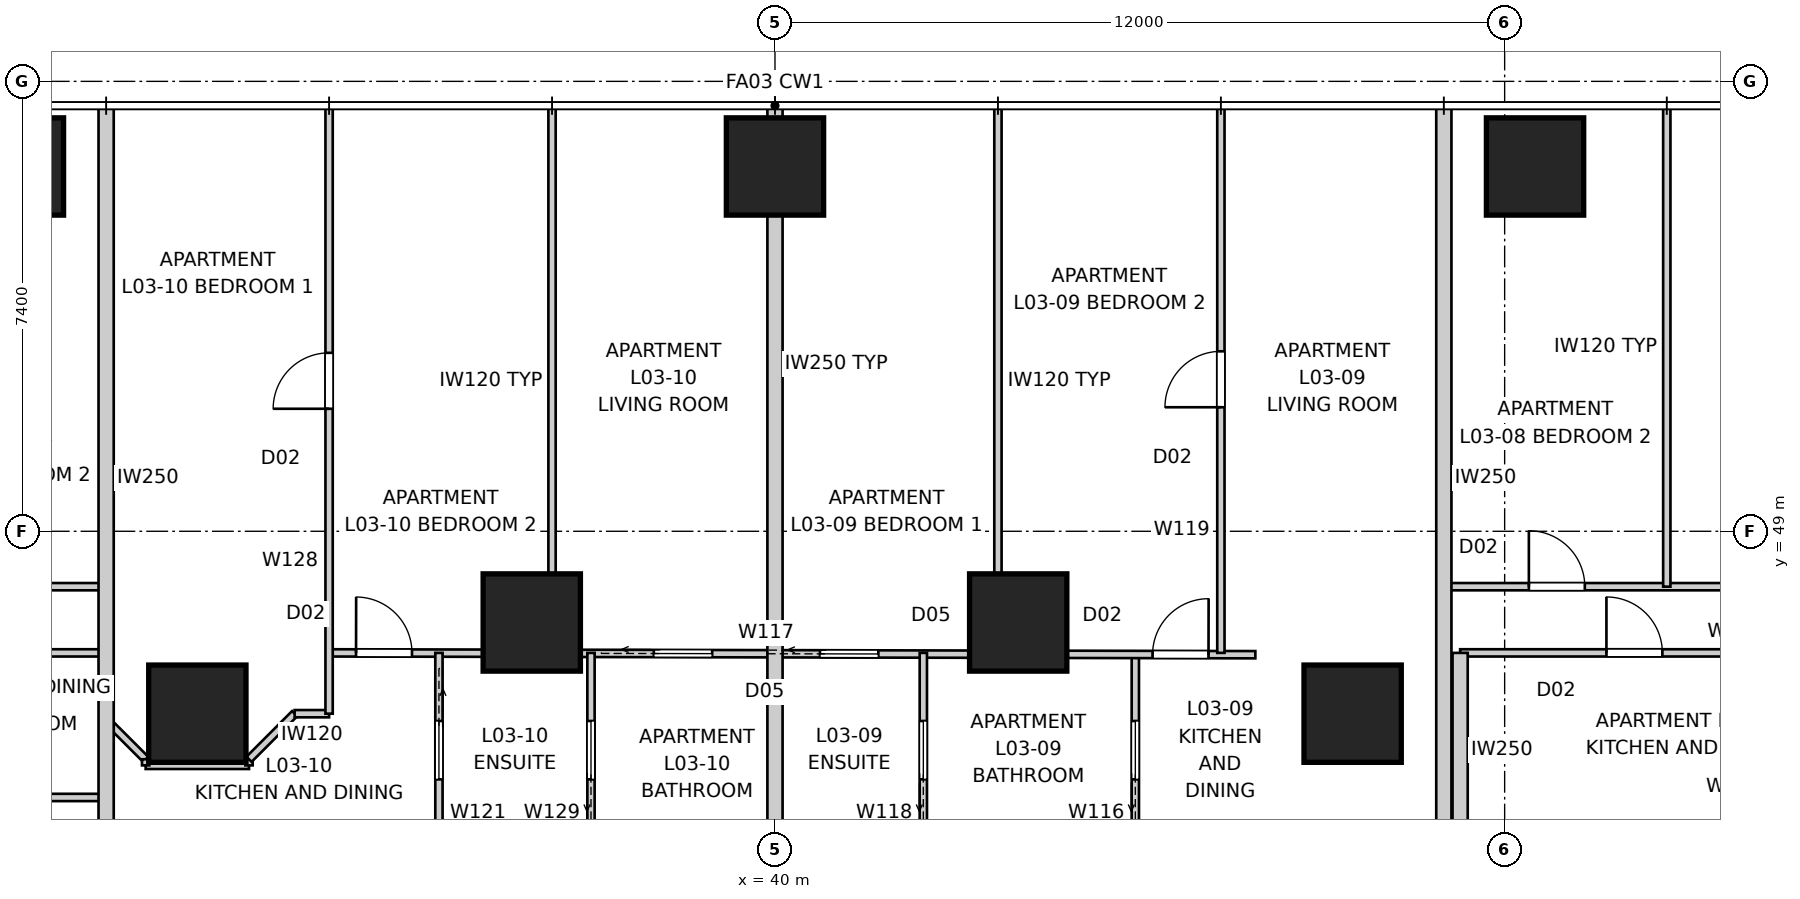
"""IFC4 building model, lengths in metres.
Left out: names, types, materials, properties, quantities, classifications, styles, units other than length and angle.
Written with IfcOpenShell. Run it as: python <this file> out.ifc"""

import sys

from ifc_helpers import new_model, si_unit, direction, frame, frame_2d, origin, origin_2d, place, context, subcontext, project, spatial, rectangle, extrude, element, fill, save


model = new_model("IFC4")
c1 = context("Model", 3, precision=1e-05, world=origin(), true_north=direction((0.0, 1.0)))
c2 = subcontext(c1, "Body", "Model", "MODEL_VIEW")
j1 = project(units=[si_unit("LENGTHUNIT", "METRE"), si_unit("PLANEANGLEUNIT", "RADIAN")], contexts=[c1])
p1 = place(None, origin())
s1 = spatial("IfcSite", under=j1, at=p1, CompositionType="ELEMENT")
p2 = place(p1, origin())
s2 = spatial("IfcBuilding", under=s1, at=p2, CompositionType="ELEMENT")
p3 = place(p2, frame((0.0, 0.0, 15.0)))
s3 = spatial("IfcBuildingStorey", under=s2, at=p3, CompositionType="ELEMENT", Elevation=15.0)
for number, where, z_axis, x_axis in (
    (1, (52.5, 55.0, 0.0), (0.0, 0.0, 1.0), (1.0, 0.0, 0.0)),
    (2, (40.0, 55.0, 0.0), (0.0, 0.0, 1.0), (1.0, 0.0, 0.0)),
    (3, (27.5, 55.0, 0.0), (0.0, 0.0, 1.0), (1.0, 0.0, 0.0)),
    (4, (49.5, 46.0, 0.0), (0.0, 0.0, 1.0), (1.0, 0.0, 0.0)),
    (5, (44.0, 47.5, 0.0), (0.0, 0.0, 1.0), (1.0, 0.0, 0.0)),
    (6, (36.0, 47.5, 0.0), (0.0, 0.0, 1.0), (1.0, 0.0, 0.0)),
    (7, (30.5, 46.0, 0.0), (0.0, 0.0, 1.0), (1.0, 0.0, 0.0)),
):
    element("IfcColumn", number, at=place(p3, frame(where, z_axis=z_axis, x_axis=x_axis)), inside=s3, PredefinedType="COLUMN", context=c2, shape_type="SweptSolid", body=[
        extrude(rectangle(XDim=1.6, YDim=1.6, at=origin_2d()), origin(), (0.0, 0.0, 1.0), 3.4),
    ])
for number, where, z_axis, x_axis in (
    (8, (51.0, 56.0, 0.0), (0.0, 0.0, 1.0), (0.0, -1.0, 0.0)),
    (9, (29.0, 56.0, 0.0), (0.0, 0.0, 1.0), (0.0, -1.0, 0.0)),
):
    element("IfcWall", number, at=place(p3, frame(where, z_axis=z_axis, x_axis=x_axis)), inside=s3, PredefinedType="PARTITIONING", context=c2, shape_type="SweptSolid", body=[
        extrude(rectangle(XDim=12.24, YDim=0.25, at=frame_2d((6.12, 0.0))), origin(), (0.0, 0.0, 1.0), 3.25),
    ])
p4 = place(p3, frame((40.0, 56.0, 0.0), z_axis=(0.0, 0.0, 1.0), x_axis=(0.0, -1.0, 0.0)))
e10 = element("IfcWall", 10, at=p4, inside=s3, PredefinedType="PARTITIONING", context=c2, shape_type="SweptSolid", body=[
    extrude(rectangle(XDim=8.5, YDim=0.25, at=frame_2d((4.25, 0.0))), origin(), (0.0, 0.0, 1.0), 3.25),
])
p5 = place(p3, frame((40.0, 47.5, 0.0), z_axis=(0.0, 0.0, 1.0), x_axis=(0.0, -1.0, 0.0)))
e11 = element("IfcWall", 11, at=p5, inside=s3, PredefinedType="PARTITIONING", context=c2, shape_type="SweptSolid", body=[
    extrude(rectangle(XDim=3.74, YDim=0.25, at=frame_2d((1.87, 0.0))), origin(), (0.0, 0.0, 1.0), 2.796),
])
p6 = place(p3, frame((51.268, 47.0, 0.0), z_axis=(0.0, 0.0, 1.0), x_axis=(1.0, 0.0, 0.0)))
e12 = element("IfcWall", 12, at=p6, inside=s3, PredefinedType="PARTITIONING", context=c2, shape_type="SweptSolid", body=[
    extrude(rectangle(XDim=5.732, YDim=0.12, at=frame_2d((2.866, 0.0))), origin(), (0.0, 0.0, 1.0), 3.25),
])
p7 = place(p6, frame((2.406, 0.0, 0.0)))
e13 = element("IfcOpeningElement", 13, at=p7, cuts=e12, PredefinedType="OPENING", context=c2, shape_type="SweptSolid", body=[
    extrude(rectangle(XDim=0.92, YDim=2.34, at=frame_2d((0.46, 1.17))), frame((0.0, 0.07, 0.0), z_axis=(0.0, -1.0, 0.0), x_axis=(1.0, 0.0, 0.0)), (0.0, 0.0, 1.0), 0.14),
])
p8 = place(p3, frame((51.268, 43.8, 0.0), z_axis=(0.0, 0.0, 1.0), x_axis=(0.0, 1.0, 0.0)))
e14 = element("IfcWall", 14, at=p8, inside=s3, PredefinedType="PARTITIONING", context=c2, shape_type="SweptSolid", body=[
    extrude(rectangle(XDim=3.2, YDim=0.25, at=frame_2d((1.6, 0.0))), origin(), (0.0, 0.0, 1.0), 3.25),
])
p9 = place(p3, frame((51.0, 48.089, 0.0), z_axis=(0.0, 0.0, 1.0), x_axis=(1.0, 0.0, 0.0)))
e15 = element("IfcWall", 15, at=p9, inside=s3, PredefinedType="PARTITIONING", context=c2, shape_type="SweptSolid", body=[
    extrude(rectangle(XDim=14.96, YDim=0.12, at=frame_2d((7.48, 0.0))), origin(), (0.0, 0.0, 1.0), 3.25),
])
p10 = place(p9, frame((6.298, 0.0, 0.0)))
e16 = element("IfcOpeningElement", 16, at=p10, cuts=e15, PredefinedType="OPENING", context=c2, shape_type="SweptSolid", body=[
    extrude(rectangle(XDim=0.92, YDim=2.34, at=frame_2d((0.46, 1.17))), frame((0.0, 0.07, 0.0), z_axis=(0.0, -1.0, 0.0), x_axis=(1.0, 0.0, 0.0)), (0.0, 0.0, 1.0), 0.14),
])
p11 = place(p9, frame((1.398, 0.0, 0.0)))
e17 = element("IfcOpeningElement", 17, at=p11, cuts=e15, PredefinedType="OPENING", context=c2, shape_type="SweptSolid", body=[
    extrude(rectangle(XDim=0.92, YDim=2.34, at=frame_2d((0.46, 1.17))), frame((0.0, 0.07, 0.0), z_axis=(0.0, -1.0, 0.0), x_axis=(1.0, 0.0, 0.0)), (0.0, 0.0, 1.0), 0.14),
])
p12 = place(p3, frame((54.667, 48.089, 0.0), z_axis=(0.0, 0.0, 1.0), x_axis=(0.0, 1.0, 0.0)))
e18 = element("IfcWall", 18, at=p12, inside=s3, PredefinedType="PARTITIONING", context=c2, shape_type="SweptSolid", body=[
    extrude(rectangle(XDim=7.871, YDim=0.12, at=frame_2d((3.936, 0.0))), origin(), (0.0, 0.0, 1.0), 2.637),
])
p13 = place(p3, frame((45.926, 43.83, 0.0), z_axis=(0.0, 0.0, 1.0), x_axis=(0.0, 1.0, 0.0)))
e19 = element("IfcWall", 19, at=p13, inside=s3, PredefinedType="PARTITIONING", context=c2, shape_type="SweptSolid", body=[
    extrude(rectangle(XDim=3.14, YDim=0.12, at=frame_2d((1.57, 0.0))), origin(), (0.0, 0.0, 1.0), 3.25),
])
p14 = place(p13, frame((1.09, 0.0, 0.0)))
e20 = element("IfcOpeningElement", 20, at=p14, cuts=e19, PredefinedType="OPENING", context=c2, shape_type="SweptSolid", body=[
    extrude(rectangle(XDim=0.96, YDim=2.1, at=frame_2d((0.48, 1.05))), frame((0.0, 0.07, 0.0), z_axis=(0.0, -1.0, 0.0), x_axis=(1.0, 0.0, 0.0)), (0.0, 0.0, 1.0), 0.14),
])
p15 = place(p3, frame((32.667, 47.0, 0.0), z_axis=(0.0, 0.0, 1.0), x_axis=(0.999998056971, -0.001971307974, 0.0)))
e21 = element("IfcWall", 21, at=p15, inside=s3, PredefinedType="PARTITIONING", context=c2, shape_type="SweptSolid", body=[
    extrude(rectangle(XDim=15.233, YDim=0.12, at=frame_2d((7.617, 0.0))), origin(), (0.0, 0.0, 1.0), 2.549),
])
p16 = place(p15, frame((0.443, 0.0, 0.0)))
e22 = element("IfcOpeningElement", 22, at=p16, cuts=e21, PredefinedType="OPENING", context=c2, shape_type="SweptSolid", body=[
    extrude(rectangle(XDim=0.92, YDim=2.34, at=frame_2d((0.46, 1.17))), frame((0.0, 0.07, 0.0), z_axis=(0.0, -1.0, 0.0), x_axis=(1.0, 0.0, 0.0)), (0.0, 0.0, 1.0), 0.14),
])
p17 = place(p15, frame((13.543, 0.0, 0.0)))
e23 = element("IfcOpeningElement", 23, at=p17, cuts=e21, PredefinedType="OPENING", context=c2, shape_type="SweptSolid", body=[
    extrude(rectangle(XDim=0.92, YDim=2.34, at=frame_2d((0.46, 1.17))), frame((0.0, 0.07, 0.0), z_axis=(0.0, -1.0, 0.0), x_axis=(1.0, 0.0, 0.0)), (0.0, 0.0, 1.0), 0.14),
])
p18 = place(p15, frame((5.34, 0.0, 0.0)))
e24 = element("IfcOpeningElement", 24, at=p18, cuts=e21, PredefinedType="OPENING", context=c2, shape_type="SweptSolid", body=[
    extrude(rectangle(XDim=0.96, YDim=2.1, at=frame_2d((0.48, 1.05))), frame((0.0, 0.07, 0.0), z_axis=(0.0, -1.0, 0.0), x_axis=(1.0, 0.0, 0.0)), (0.0, 0.0, 1.0), 0.14),
])
p19 = place(p15, frame((8.073, 0.0, 0.0)))
e25 = element("IfcOpeningElement", 25, at=p19, cuts=e21, PredefinedType="OPENING", context=c2, shape_type="SweptSolid", body=[
    extrude(rectangle(XDim=0.96, YDim=2.1, at=frame_2d((0.48, 1.05))), frame((0.0, 0.07, 0.0), z_axis=(0.0, -1.0, 0.0), x_axis=(1.0, 0.0, 0.0)), (0.0, 0.0, 1.0), 0.14),
])
p20 = place(p3, frame((42.44, 43.8, 0.0), z_axis=(0.0, 0.0, 1.0), x_axis=(0.0, 1.0, 0.0)))
e26 = element("IfcWall", 26, at=p20, inside=s3, PredefinedType="PARTITIONING", context=c2, shape_type="SweptSolid", body=[
    extrude(rectangle(XDim=3.2, YDim=0.12, at=frame_2d((1.6, 0.0))), origin(), (0.0, 0.0, 1.0), 3.25),
])
p21 = place(p20, frame((1.12, 0.0, 0.0)))
e27 = element("IfcOpeningElement", 27, at=p21, cuts=e26, PredefinedType="OPENING", context=c2, shape_type="SweptSolid", body=[
    extrude(rectangle(XDim=0.96, YDim=2.1, at=frame_2d((0.48, 1.05))), frame((0.0, 0.07, 0.0), z_axis=(0.0, -1.0, 0.0), x_axis=(1.0, 0.0, 0.0)), (0.0, 0.0, 1.0), 0.14),
])
p22 = place(p3, frame((47.333, 47.0, 0.0), z_axis=(0.0, 0.0, 1.0), x_axis=(0.0, 1.0, 0.0)))
e28 = element("IfcWall", 28, at=p22, inside=s3, PredefinedType="PARTITIONING", context=c2, shape_type="SweptSolid", body=[
    extrude(rectangle(XDim=8.96, YDim=0.12, at=frame_2d((4.48, 0.0))), origin(), (0.0, 0.0, 1.0), 3.25),
])
p23 = place(p22, frame((4.04, 0.0, 0.0)))
e29 = element("IfcOpeningElement", 29, at=p23, cuts=e28, PredefinedType="OPENING", context=c2, shape_type="SweptSolid", body=[
    extrude(rectangle(XDim=0.92, YDim=2.34, at=frame_2d((0.46, 1.17))), frame((0.0, 0.07, 0.0), z_axis=(0.0, -1.0, 0.0), x_axis=(1.0, 0.0, 0.0)), (0.0, 0.0, 1.0), 0.14),
])
p24 = place(p3, frame((43.667, 55.96, 0.0), z_axis=(0.0, 0.0, 1.0), x_axis=(0.0, -1.0, 0.0)))
e30 = element("IfcWall", 30, at=p24, inside=s3, PredefinedType="PARTITIONING", context=c2, shape_type="SweptSolid", body=[
    extrude(rectangle(XDim=8.96, YDim=0.12, at=frame_2d((4.48, 0.0))), origin(), (0.0, 0.0, 1.0), 3.25),
])
p25 = place(p3, frame((34.473, 47.0, 0.0), z_axis=(0.0, 0.0, 1.0), x_axis=(0.0, -1.0, 0.0)))
e31 = element("IfcWall", 31, at=p25, inside=s3, PredefinedType="PARTITIONING", context=c2, shape_type="SweptSolid", body=[
    extrude(rectangle(XDim=3.2, YDim=0.12, at=frame_2d((1.6, 0.0))), origin(), (0.0, 0.0, 1.0), 3.25),
])
p26 = place(p25, frame((1.12, 0.0, 0.0)))
e32 = element("IfcOpeningElement", 32, at=p26, cuts=e31, PredefinedType="OPENING", context=c2, shape_type="SweptSolid", body=[
    extrude(rectangle(XDim=0.96, YDim=2.1, at=frame_2d((0.48, 1.05))), frame((0.0, 0.07, 0.0), z_axis=(0.0, -1.0, 0.0), x_axis=(1.0, 0.0, 0.0)), (0.0, 0.0, 1.0), 0.14),
])
p27 = place(p3, frame((29.0, 45.9, 0.0), z_axis=(0.0, 0.0, 1.0), x_axis=(0.707106781187, -0.707106781187, 0.0)))
e33 = element("IfcWall", 33, at=p27, inside=s3, PredefinedType="PARTITIONING", context=c2, shape_type="SweptSolid", body=[
    extrude(rectangle(XDim=0.919, YDim=0.12, at=frame_2d((0.459, 0.0))), origin(), (0.0, 0.0, 1.0), 3.25),
])
p28 = place(p3, frame((29.65, 45.15, 0.0), z_axis=(0.0, 0.0, 1.0), x_axis=(1.0, 0.0, 0.0)))
e34 = element("IfcWall", 34, at=p28, inside=s3, PredefinedType="PARTITIONING", context=c2, shape_type="SweptSolid", body=[
    extrude(rectangle(XDim=1.7, YDim=0.12, at=frame_2d((0.85, 0.0))), origin(), (0.0, 0.0, 1.0), 3.25),
])
p29 = place(p3, frame((31.35, 45.25, 0.0), z_axis=(0.0, 0.0, 1.0), x_axis=(0.707106781187, 0.707106781187, 0.0)))
e35 = element("IfcWall", 35, at=p29, inside=s3, PredefinedType="PARTITIONING", context=c2, shape_type="SweptSolid", body=[
    extrude(rectangle(XDim=1.061, YDim=0.12, at=frame_2d((0.53, 0.0))), origin(), (0.0, 0.0, 1.0), 3.25),
])
p30 = place(p3, frame((32.1, 46.0, 0.0), z_axis=(0.0, 0.0, 1.0), x_axis=(1.0, 0.0, 0.0)))
e36 = element("IfcWall", 36, at=p30, inside=s3, PredefinedType="PARTITIONING", context=c2, shape_type="SweptSolid", body=[
    extrude(rectangle(XDim=0.567, YDim=0.12, at=frame_2d((0.283, 0.0))), origin(), (0.0, 0.0, 1.0), 3.25),
])
p31 = place(p3, frame((32.667, 46.0, 0.0), z_axis=(0.0, 0.0, 1.0), x_axis=(0.0, 1.0, 0.0)))
e37 = element("IfcWall", 37, at=p31, inside=s3, PredefinedType="PARTITIONING", context=c2, shape_type="SweptSolid", body=[
    extrude(rectangle(XDim=9.96, YDim=0.12, at=frame_2d((4.98, 0.0))), origin(), (0.0, 0.0, 1.0), 3.25),
])
p32 = place(p31, frame((5.015, 0.0, 0.0)))
e38 = element("IfcOpeningElement", 38, at=p32, cuts=e37, PredefinedType="OPENING", context=c2, shape_type="SweptSolid", body=[
    extrude(rectangle(XDim=0.92, YDim=2.34, at=frame_2d((0.46, 1.17))), frame((0.0, 0.07, 0.0), z_axis=(0.0, -1.0, 0.0), x_axis=(1.0, 0.0, 0.0)), (0.0, 0.0, 1.0), 0.14),
])
p33 = place(p3, frame((36.974, 43.8, 0.0), z_axis=(0.0, 0.0, 1.0), x_axis=(0.0, 1.0, 0.0)))
e39 = element("IfcWall", 39, at=p33, inside=s3, PredefinedType="PARTITIONING", context=c2, shape_type="SweptSolid", body=[
    extrude(rectangle(XDim=3.2, YDim=0.12, at=frame_2d((1.6, 0.0))), origin(), (0.0, 0.0, 1.0), 3.25),
])
p34 = place(p33, frame((1.12, 0.0, 0.0)))
e40 = element("IfcOpeningElement", 40, at=p34, cuts=e39, PredefinedType="OPENING", context=c2, shape_type="SweptSolid", body=[
    extrude(rectangle(XDim=0.96, YDim=2.1, at=frame_2d((0.48, 1.05))), frame((0.0, 0.07, 0.0), z_axis=(0.0, -1.0, 0.0), x_axis=(1.0, 0.0, 0.0)), (0.0, 0.0, 1.0), 0.14),
])
p35 = place(p3, frame((36.333, 47.0, 0.0), z_axis=(0.0, 0.0, 1.0), x_axis=(0.0, 1.0, 0.0)))
e41 = element("IfcWall", 41, at=p35, inside=s3, PredefinedType="PARTITIONING", context=c2, shape_type="SweptSolid", body=[
    extrude(rectangle(XDim=8.96, YDim=0.12, at=frame_2d((4.48, 0.0))), origin(), (0.0, 0.0, 1.0), 3.25),
])
p36 = place(p3, frame((23.0, 44.622, 0.0), z_axis=(0.0, 0.0, 1.0), x_axis=(1.0, 0.0, 0.0)))
e42 = element("IfcWall", 42, at=p36, inside=s3, PredefinedType="PARTITIONING", context=c2, shape_type="SweptSolid", body=[
    extrude(rectangle(XDim=6.0, YDim=0.12, at=frame_2d((3.0, 0.0))), origin(), (0.0, 0.0, 1.0), 2.637),
])
p37 = place(p36, frame((1.47, 0.0, 0.0)))
e43 = element("IfcOpeningElement", 43, at=p37, cuts=e42, PredefinedType="OPENING", context=c2, shape_type="SweptSolid", body=[
    extrude(rectangle(XDim=0.96, YDim=2.1, at=frame_2d((0.48, 1.05))), frame((0.0, 0.07, 0.0), z_axis=(0.0, -1.0, 0.0), x_axis=(1.0, 0.0, 0.0)), (0.0, 0.0, 1.0), 0.14),
])
p38 = place(p3, frame((23.0, 47.0, 0.0), z_axis=(0.0, 0.0, 1.0), x_axis=(1.0, 0.0, 0.0)))
e44 = element("IfcWall", 44, at=p38, inside=s3, PredefinedType="PARTITIONING", context=c2, shape_type="SweptSolid", body=[
    extrude(rectangle(XDim=6.0, YDim=0.12, at=frame_2d((3.0, 0.0))), origin(), (0.0, 0.0, 1.0), 3.25),
])
p39 = place(p3, frame((14.04, 48.089, 0.0), z_axis=(0.0, 0.0, 1.0), x_axis=(1.0, 0.0, 0.0)))
e45 = element("IfcWall", 45, at=p39, inside=s3, PredefinedType="PARTITIONING", context=c2, shape_type="SweptSolid", body=[
    extrude(rectangle(XDim=14.96, YDim=0.12, at=frame_2d((7.48, 0.0))), origin(), (0.0, 0.0, 1.0), 3.25),
])
p40 = place(p39, frame((7.742, 0.0, 0.0)))
e46 = element("IfcOpeningElement", 46, at=p40, cuts=e45, PredefinedType="OPENING", context=c2, shape_type="SweptSolid", body=[
    extrude(rectangle(XDim=0.92, YDim=2.34, at=frame_2d((0.46, 1.17))), frame((0.0, 0.07, 0.0), z_axis=(0.0, -1.0, 0.0), x_axis=(1.0, 0.0, 0.0)), (0.0, 0.0, 1.0), 0.14),
])
p41 = place(p39, frame((12.642, 0.0, 0.0)))
e47 = element("IfcOpeningElement", 47, at=p41, cuts=e45, PredefinedType="OPENING", context=c2, shape_type="SweptSolid", body=[
    extrude(rectangle(XDim=0.92, YDim=2.34, at=frame_2d((0.46, 1.17))), frame((0.0, 0.07, 0.0), z_axis=(0.0, -1.0, 0.0), x_axis=(1.0, 0.0, 0.0)), (0.0, 0.0, 1.0), 0.14),
])
for number, where, z_axis, x_axis in (
    (48, (29.65, 45.15, 0.0), (0.0, 0.0, 1.0), (0.0, 1.0, 0.0)),
    (49, (31.35, 45.15, 0.0), (0.0, 0.0, 1.0), (0.0, 1.0, 0.0)),
):
    element("IfcWall", number, at=place(p3, frame(where, z_axis=z_axis, x_axis=x_axis)), inside=s3, PredefinedType="PARTITIONING", context=c2, shape_type="SweptSolid", body=[
        extrude(rectangle(XDim=0.1, YDim=0.12, at=frame_2d((0.05, 0.0))), origin(), (0.0, 0.0, 1.0), 3.25),
    ])
p42 = place(p26, origin())
e50 = element("IfcDoor", 50, at=p42, inside=s3, OperationType="SLIDING_TO_LEFT", PredefinedType="DOOR", context=c2, shape_type="SweptSolid", body=[
    extrude(rectangle(XDim=0.96, YDim=2.1, at=frame_2d((0.48, 1.05))), frame((0.0, 0.025, 0.0), z_axis=(0.0, -1.0, 0.0), x_axis=(1.0, 0.0, 0.0)), (0.0, 0.0, 1.0), 0.05),
])
fill(e32, e50)
p43 = place(p16, origin())
e51 = element("IfcDoor", 51, at=p43, inside=s3, OperationType="SINGLE_SWING_LEFT", PredefinedType="DOOR", context=c2, shape_type="SweptSolid", body=[
    extrude(rectangle(XDim=0.92, YDim=2.34, at=frame_2d((0.46, 1.17))), frame((0.0, 0.025, 0.0), z_axis=(0.0, -1.0, 0.0), x_axis=(1.0, 0.0, 0.0)), (0.0, 0.0, 1.0), 0.05),
])
fill(e22, e51)
p44 = place(p14, origin())
e52 = element("IfcDoor", 52, at=p44, inside=s3, OperationType="SLIDING_TO_LEFT", PredefinedType="DOOR", context=c2, shape_type="SweptSolid", body=[
    extrude(rectangle(XDim=0.96, YDim=2.1, at=frame_2d((0.48, 1.05))), frame((0.0, 0.025, 0.0), z_axis=(0.0, -1.0, 0.0), x_axis=(1.0, 0.0, 0.0)), (0.0, 0.0, 1.0), 0.05),
])
fill(e20, e52)
p45 = place(p17, origin())
e53 = element("IfcDoor", 53, at=p45, inside=s3, OperationType="SINGLE_SWING_RIGHT", PredefinedType="DOOR", context=c2, shape_type="SweptSolid", body=[
    extrude(rectangle(XDim=0.92, YDim=2.34, at=frame_2d((0.46, 1.17))), frame((0.0, 0.025, 0.0), z_axis=(0.0, -1.0, 0.0), x_axis=(1.0, 0.0, 0.0)), (0.0, 0.0, 1.0), 0.05),
])
fill(e23, e53)
p46 = place(p7, origin())
e54 = element("IfcDoor", 54, at=p46, inside=s3, OperationType="SINGLE_SWING_LEFT", PredefinedType="DOOR", context=c2, shape_type="SweptSolid", body=[
    extrude(rectangle(XDim=0.92, YDim=2.34, at=frame_2d((0.46, 1.17))), frame((0.0, 0.025, 0.0), z_axis=(0.0, -1.0, 0.0), x_axis=(1.0, 0.0, 0.0)), (0.0, 0.0, 1.0), 0.05),
])
fill(e13, e54)
p47 = place(p34, origin())
e55 = element("IfcDoor", 55, at=p47, inside=s3, OperationType="SLIDING_TO_LEFT", PredefinedType="DOOR", context=c2, shape_type="SweptSolid", body=[
    extrude(rectangle(XDim=0.96, YDim=2.1, at=frame_2d((0.48, 1.05))), frame((0.0, 0.025, 0.0), z_axis=(0.0, -1.0, 0.0), x_axis=(1.0, 0.0, 0.0)), (0.0, 0.0, 1.0), 0.05),
])
fill(e40, e55)
p48 = place(p21, origin())
e56 = element("IfcDoor", 56, at=p48, inside=s3, OperationType="SLIDING_TO_LEFT", PredefinedType="DOOR", context=c2, shape_type="SweptSolid", body=[
    extrude(rectangle(XDim=0.96, YDim=2.1, at=frame_2d((0.48, 1.05))), frame((0.0, 0.025, 0.0), z_axis=(0.0, -1.0, 0.0), x_axis=(1.0, 0.0, 0.0)), (0.0, 0.0, 1.0), 0.05),
])
fill(e27, e56)
p49 = place(p11, origin())
e57 = element("IfcDoor", 57, at=p49, inside=s3, OperationType="SINGLE_SWING_LEFT", PredefinedType="DOOR", context=c2, shape_type="SweptSolid", body=[
    extrude(rectangle(XDim=0.92, YDim=2.34, at=frame_2d((0.46, 1.17))), frame((0.0, 0.025, 0.0), z_axis=(0.0, -1.0, 0.0), x_axis=(1.0, 0.0, 0.0)), (0.0, 0.0, 1.0), 0.05),
])
fill(e17, e57)
p50 = place(p18, origin())
e58 = element("IfcDoor", 58, at=p50, inside=s3, OperationType="SLIDING_TO_LEFT", PredefinedType="DOOR", context=c2, shape_type="SweptSolid", body=[
    extrude(rectangle(XDim=0.96, YDim=2.1, at=frame_2d((0.48, 1.05))), frame((0.0, 0.025, 0.0), z_axis=(0.0, -1.0, 0.0), x_axis=(1.0, 0.0, 0.0)), (0.0, 0.0, 1.0), 0.05),
])
fill(e24, e58)
p51 = place(p19, origin())
e59 = element("IfcDoor", 59, at=p51, inside=s3, OperationType="SLIDING_TO_LEFT", PredefinedType="DOOR", context=c2, shape_type="SweptSolid", body=[
    extrude(rectangle(XDim=0.96, YDim=2.1, at=frame_2d((0.48, 1.05))), frame((0.0, 0.025, 0.0), z_axis=(0.0, -1.0, 0.0), x_axis=(1.0, 0.0, 0.0)), (0.0, 0.0, 1.0), 0.05),
])
fill(e25, e59)
p52 = place(p32, origin())
e60 = element("IfcDoor", 60, at=p52, inside=s3, OperationType="SINGLE_SWING_LEFT", PredefinedType="DOOR", context=c2, shape_type="SweptSolid", body=[
    extrude(rectangle(XDim=0.92, YDim=2.34, at=frame_2d((0.46, 1.17))), frame((0.0, 0.025, 0.0), z_axis=(0.0, -1.0, 0.0), x_axis=(1.0, 0.0, 0.0)), (0.0, 0.0, 1.0), 0.05),
])
fill(e38, e60)
p53 = place(p23, origin())
e61 = element("IfcDoor", 61, at=p53, inside=s3, OperationType="SINGLE_SWING_LEFT", PredefinedType="DOOR", context=c2, shape_type="SweptSolid", body=[
    extrude(rectangle(XDim=0.92, YDim=2.34, at=frame_2d((0.46, 1.17))), frame((0.0, 0.025, 0.0), z_axis=(0.0, -1.0, 0.0), x_axis=(1.0, 0.0, 0.0)), (0.0, 0.0, 1.0), 0.05),
])
fill(e29, e61)
save(model, sys.argv[1])
